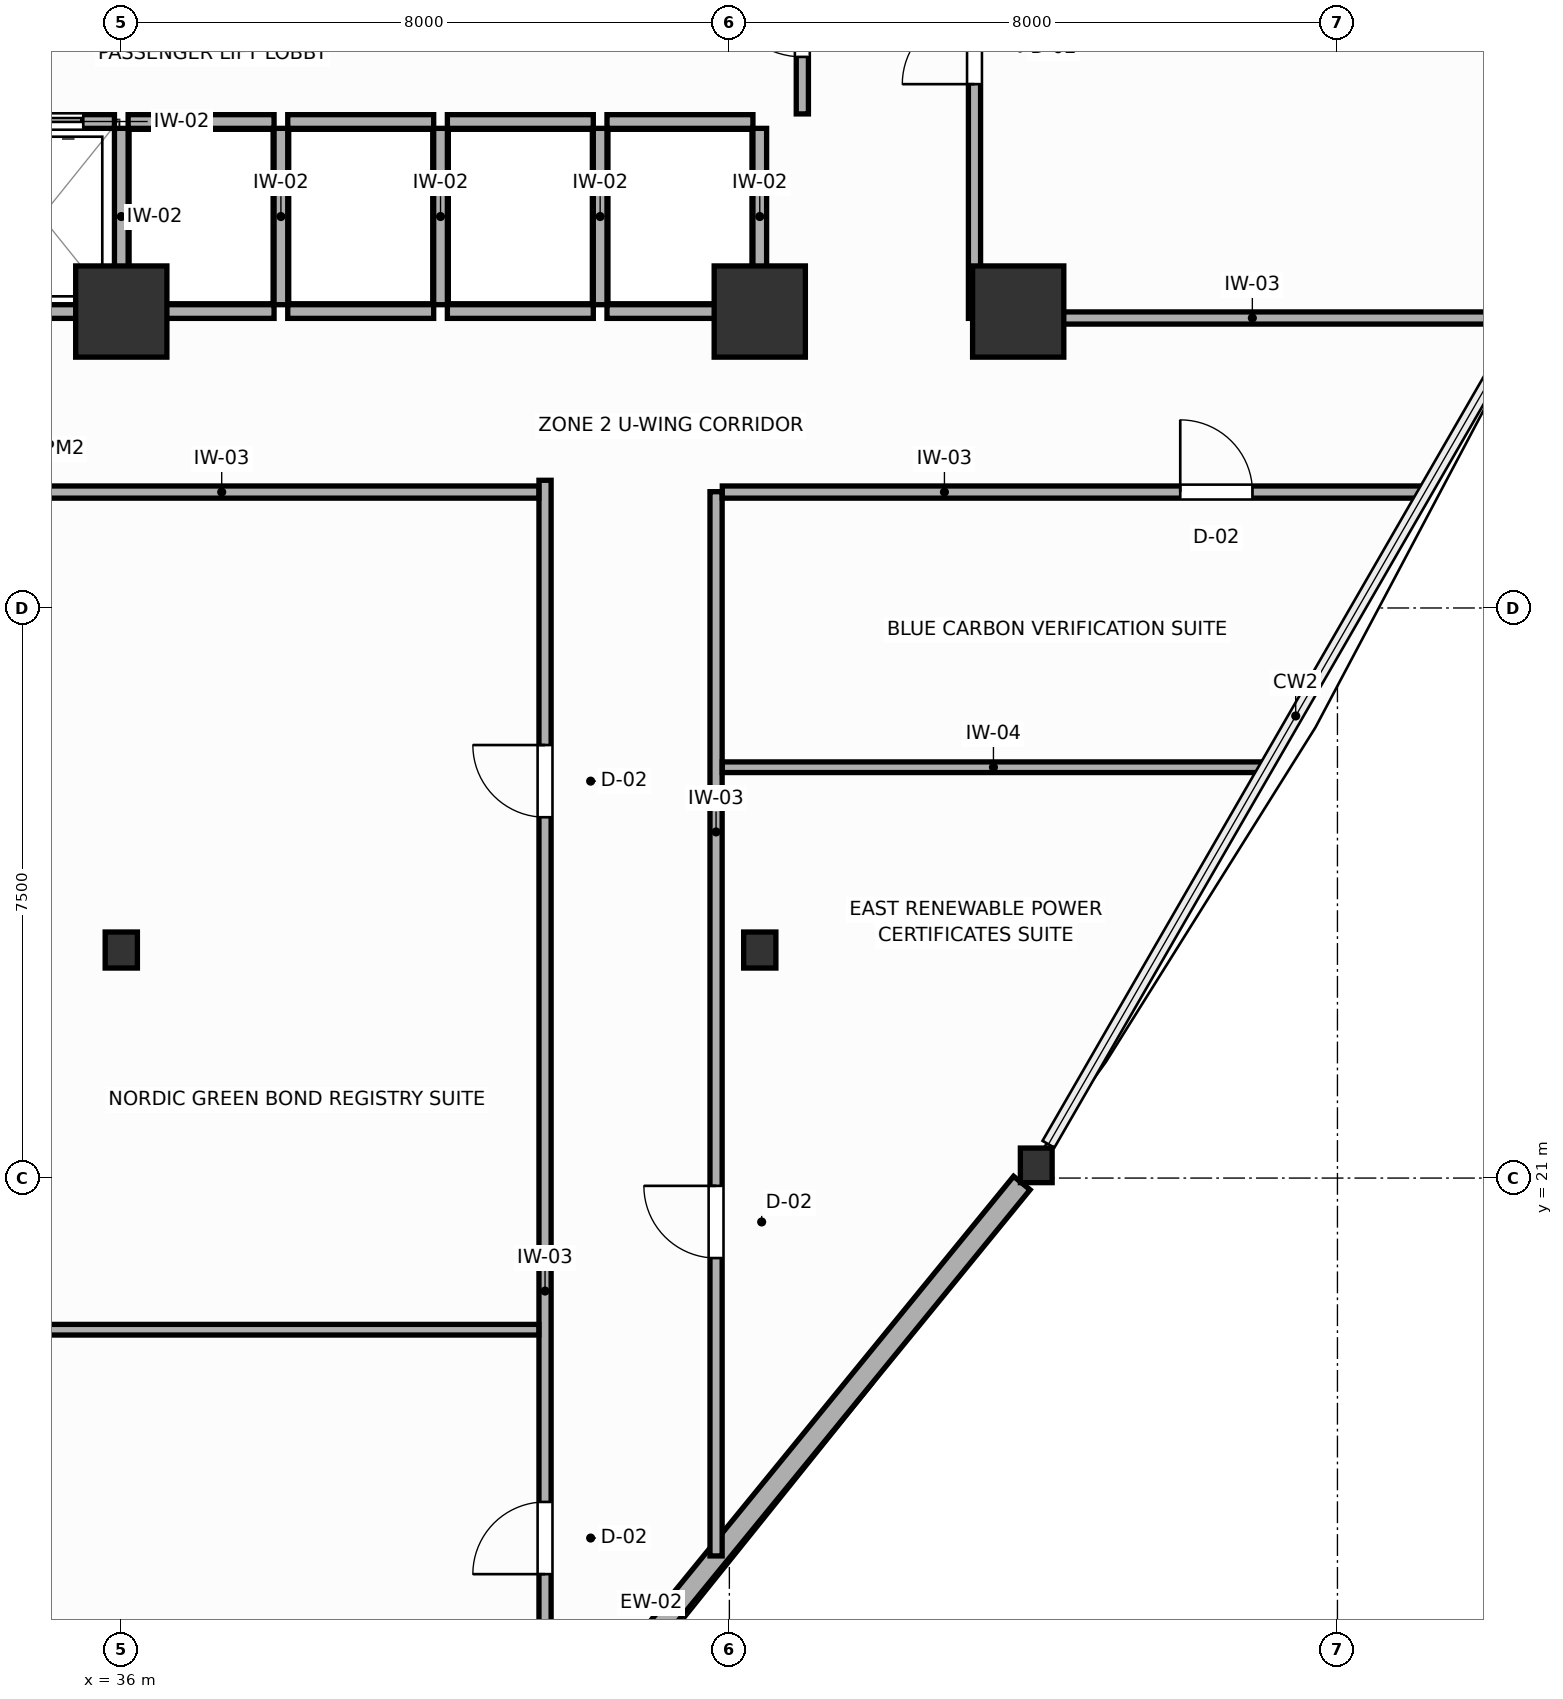
"""IFC4 building model, lengths in metres.
Left out: names, types, materials, properties, quantities, classifications, styles, units other than length and angle.
Written with IfcOpenShell. Run it as: python <this file> out.ifc"""

import sys

from ifc_helpers import new_model, si_unit, direction, frame, frame_2d, origin, origin_2d, place, context, subcontext, project, spatial, rectangle, i_section, extrude, source, transform, mapped, element, fill, save


model = new_model("IFC4")
c1 = context("Model", 3, precision=1e-05, world=origin(), true_north=direction((0.0, 1.0)))
c2 = subcontext(c1, "Body", "Model", "MODEL_VIEW")
j1 = project(units=[si_unit("LENGTHUNIT", "METRE"), si_unit("PLANEANGLEUNIT", "RADIAN")], contexts=[c1])
p1 = place(None, origin())
s1 = spatial("IfcSite", under=j1, at=p1, CompositionType="ELEMENT")
p2 = place(p1, origin())
s2 = spatial("IfcBuilding", under=s1, at=p2, CompositionType="ELEMENT")
p3 = place(p2, frame((0.0, 0.0, 127.8)))
s3 = spatial("IfcBuildingStorey", under=s2, at=p3, CompositionType="ELEMENT", Elevation=127.8)
m1 = source(origin(), c2, "Body", "SweptSolid", [
    extrude(rectangle(XDim=1.2, YDim=1.2, at=origin_2d()), origin(), (0.0, 0.0, 1.0), 3.6),
])
for number, where, z_axis, x_axis in (
    (1, (44.4, 32.4, 0.0), (0.0, 0.0, 1.0), (1.0, 0.0, 0.0)),
    (2, (36.0, 32.4, 0.0), (0.0, 0.0, 1.0), (1.0, 0.0, 0.0)),
    (3, (47.8, 32.4, 0.0), (0.0, 0.0, 1.0), (1.0, 0.0, 0.0)),
):
    element("IfcColumn", number, at=place(p3, frame(where, z_axis=z_axis, x_axis=x_axis)), inside=s3, PredefinedType="COLUMN", context=c2, shape_type="MappedRepresentation", body=[
        mapped(m1, transform((0.0, 0.0, 0.0), scale=1.0)),
    ])
m2 = source(origin(), c2, "Body", "SweptSolid", [
    extrude(i_section(OverallWidth=0.424, OverallDepth=0.474, WebThickness=0.045, FlangeThickness=0.072, FilletRadius=0.015, at=origin_2d()), origin(), (0.0, 0.0, 1.0), 3.6),
])
for number, where, z_axis, x_axis in (
    (4, (44.4, 24.0, 0.0), (0.0, 0.0, 1.0), (1.0, 0.0, 0.0)),
    (5, (36.0, 24.0, 0.0), (0.0, 0.0, 1.0), (1.0, 0.0, 0.0)),
):
    element("IfcColumn", number, at=place(p3, frame(where, z_axis=z_axis, x_axis=x_axis)), inside=s3, PredefinedType="COLUMN", context=c2, shape_type="MappedRepresentation", body=[
        mapped(m2, transform((0.0, 0.0, 0.0), scale=1.0)),
    ])
m3 = source(origin(), c2, "Body", "SweptSolid", [
    extrude(i_section(OverallWidth=0.418, OverallDepth=0.455, WebThickness=0.039, FlangeThickness=0.063, FilletRadius=0.015, at=origin_2d()), origin(), (0.0, 0.0, 1.0), 3.6),
])
p4 = place(p3, frame((48.038, 21.167, 0.0), z_axis=(0.0, 0.0, 1.0), x_axis=(1.0, 0.0, 0.0)))
e6 = element("IfcColumn", 6, at=p4, inside=s3, PredefinedType="COLUMN", context=c2, shape_type="MappedRepresentation", body=[
    mapped(m3, transform((0.0, 0.0, 0.0), scale=1.0)),
])
p5 = place(p3, frame((38.098, 8.996, 0.0), z_axis=(0.0, 0.0, 1.0), x_axis=(0.632511291832, 0.774551138211, 0.0)))
e7 = element("IfcWall", 7, at=p5, inside=s3, PredefinedType="SOLIDWALL", context=c2, shape_type="SweptSolid", body=[
    extrude(rectangle(XDim=15.414, YDim=0.28, at=frame_2d((7.707, 0.0))), origin(), (0.0, 0.0, 1.0), 2.86),
])
p6 = place(p3, frame((33.99, 34.9, 0.0), z_axis=(0.0, 0.0, 1.0), x_axis=(1.0, 0.0, 0.0)))
e8 = element("IfcWall", 8, at=p6, inside=s3, PredefinedType="PARTITIONING", context=c2, shape_type="SweptSolid", body=[
    extrude(rectangle(XDim=1.92, YDim=0.18, at=frame_2d((0.96, 0.0))), origin(), (0.0, 0.0, 1.0), 3.26),
])
p7 = place(p6, frame((0.41, 0.0, 0.0)))
e9 = element("IfcOpeningElement", 9, at=p7, cuts=e8, PredefinedType="OPENING", context=c2, shape_type="SweptSolid", body=[
    extrude(rectangle(XDim=1.1, YDim=2.1, at=frame_2d((0.55, 1.05))), frame((0.0, 0.1, 0.0), z_axis=(0.0, -1.0, 0.0), x_axis=(1.0, 0.0, 0.0)), (0.0, 0.0, 1.0), 0.2),
])
p8 = place(p3, frame((33.99, 32.4, 0.0), z_axis=(0.0, 0.0, 1.0), x_axis=(1.0, 0.0, 0.0)))
e10 = element("IfcWall", 10, at=p8, inside=s3, PredefinedType="PARTITIONING", context=c2, shape_type="SweptSolid", body=[
    extrude(rectangle(XDim=1.92, YDim=0.18, at=frame_2d((0.96, 0.0))), origin(), (0.0, 0.0, 1.0), 2.81),
])
p9 = place(p3, frame((36.09, 34.9, 0.0), z_axis=(0.0, 0.0, 1.0), x_axis=(1.0, 0.0, 0.0)))
e11 = element("IfcWall", 11, at=p9, inside=s3, PredefinedType="PARTITIONING", context=c2, shape_type="SweptSolid", body=[
    extrude(rectangle(XDim=1.92, YDim=0.18, at=frame_2d((0.96, 0.0))), origin(), (0.0, 0.0, 1.0), 3.26),
])
p10 = place(p3, frame((36.09, 32.4, 0.0), z_axis=(0.0, 0.0, 1.0), x_axis=(1.0, 0.0, 0.0)))
e12 = element("IfcWall", 12, at=p10, inside=s3, PredefinedType="PARTITIONING", context=c2, shape_type="SweptSolid", body=[
    extrude(rectangle(XDim=1.92, YDim=0.18, at=frame_2d((0.96, 0.0))), origin(), (0.0, 0.0, 1.0), 2.81),
])
p11 = place(p3, frame((36.0, 32.49, 0.0), z_axis=(0.0, 0.0, 1.0), x_axis=(0.0, 1.0, 0.0)))
e13 = element("IfcWall", 13, at=p11, inside=s3, PredefinedType="PARTITIONING", context=c2, shape_type="SweptSolid", body=[
    extrude(rectangle(XDim=2.32, YDim=0.18, at=frame_2d((1.16, 0.0))), origin(), (0.0, 0.0, 1.0), 3.26),
])
p12 = place(p3, frame((38.19, 34.9, 0.0), z_axis=(0.0, 0.0, 1.0), x_axis=(1.0, 0.0, 0.0)))
e14 = element("IfcWall", 14, at=p12, inside=s3, PredefinedType="PARTITIONING", context=c2, shape_type="SweptSolid", body=[
    extrude(rectangle(XDim=1.92, YDim=0.18, at=frame_2d((0.96, 0.0))), origin(), (0.0, 0.0, 1.0), 3.26),
])
p13 = place(p3, frame((38.19, 32.4, 0.0), z_axis=(0.0, 0.0, 1.0), x_axis=(1.0, 0.0, 0.0)))
e15 = element("IfcWall", 15, at=p13, inside=s3, PredefinedType="PARTITIONING", context=c2, shape_type="SweptSolid", body=[
    extrude(rectangle(XDim=1.92, YDim=0.18, at=frame_2d((0.96, 0.0))), origin(), (0.0, 0.0, 1.0), 2.81),
])
p14 = place(p3, frame((38.1, 32.49, 0.0), z_axis=(0.0, 0.0, 1.0), x_axis=(0.0, 1.0, 0.0)))
e16 = element("IfcWall", 16, at=p14, inside=s3, PredefinedType="PARTITIONING", context=c2, shape_type="SweptSolid", body=[
    extrude(rectangle(XDim=2.32, YDim=0.18, at=frame_2d((1.16, 0.0))), origin(), (0.0, 0.0, 1.0), 3.26),
])
p15 = place(p3, frame((40.29, 34.9, 0.0), z_axis=(0.0, 0.0, 1.0), x_axis=(1.0, 0.0, 0.0)))
e17 = element("IfcWall", 17, at=p15, inside=s3, PredefinedType="PARTITIONING", context=c2, shape_type="SweptSolid", body=[
    extrude(rectangle(XDim=1.92, YDim=0.18, at=frame_2d((0.96, 0.0))), origin(), (0.0, 0.0, 1.0), 3.26),
])
p16 = place(p3, frame((40.29, 32.4, 0.0), z_axis=(0.0, 0.0, 1.0), x_axis=(1.0, 0.0, 0.0)))
e18 = element("IfcWall", 18, at=p16, inside=s3, PredefinedType="PARTITIONING", context=c2, shape_type="SweptSolid", body=[
    extrude(rectangle(XDim=1.92, YDim=0.18, at=frame_2d((0.96, 0.0))), origin(), (0.0, 0.0, 1.0), 2.81),
])
p17 = place(p3, frame((40.2, 32.49, 0.0), z_axis=(0.0, 0.0, 1.0), x_axis=(0.0, 1.0, 0.0)))
e19 = element("IfcWall", 19, at=p17, inside=s3, PredefinedType="PARTITIONING", context=c2, shape_type="SweptSolid", body=[
    extrude(rectangle(XDim=2.32, YDim=0.18, at=frame_2d((1.16, 0.0))), origin(), (0.0, 0.0, 1.0), 3.26),
])
p18 = place(p3, frame((42.39, 34.9, 0.0), z_axis=(0.0, 0.0, 1.0), x_axis=(1.0, 0.0, 0.0)))
e20 = element("IfcWall", 20, at=p18, inside=s3, PredefinedType="PARTITIONING", context=c2, shape_type="SweptSolid", body=[
    extrude(rectangle(XDim=1.92, YDim=0.18, at=frame_2d((0.96, 0.0))), origin(), (0.0, 0.0, 1.0), 3.26),
])
p19 = place(p3, frame((42.39, 32.4, 0.0), z_axis=(0.0, 0.0, 1.0), x_axis=(1.0, 0.0, 0.0)))
e21 = element("IfcWall", 21, at=p19, inside=s3, PredefinedType="PARTITIONING", context=c2, shape_type="SweptSolid", body=[
    extrude(rectangle(XDim=1.92, YDim=0.18, at=frame_2d((0.96, 0.0))), origin(), (0.0, 0.0, 1.0), 2.81),
])
for number, where, z_axis, x_axis in (
    (22, (42.3, 32.49, 0.0), (0.0, 0.0, 1.0), (0.0, 1.0, 0.0)),
    (23, (44.4, 32.49, 0.0), (0.0, 0.0, 1.0), (0.0, 1.0, 0.0)),
):
    element("IfcWall", number, at=place(p3, frame(where, z_axis=z_axis, x_axis=x_axis)), inside=s3, PredefinedType="PARTITIONING", context=c2, shape_type="SweptSolid", body=[
        extrude(rectangle(XDim=2.32, YDim=0.18, at=frame_2d((1.16, 0.0))), origin(), (0.0, 0.0, 1.0), 3.26),
    ])
p20 = place(p3, frame((44.96, 35.0, 0.0), z_axis=(0.0, 0.0, 1.0), x_axis=(0.0, 1.0, 0.0)))
e24 = element("IfcWall", 24, at=p20, inside=s3, PredefinedType="PARTITIONING", context=c2, shape_type="SweptSolid", body=[
    extrude(rectangle(XDim=2.65, YDim=0.16, at=frame_2d((1.325, 0.0))), origin(), (0.0, 0.0, 1.0), 3.26),
])
p21 = place(p20, frame((0.75, 0.0, 0.0)))
e25 = element("IfcOpeningElement", 25, at=p21, cuts=e24, PredefinedType="OPENING", context=c2, shape_type="SweptSolid", body=[
    extrude(rectangle(XDim=1.05, YDim=2.1, at=frame_2d((0.525, 1.05))), frame((0.0, 0.09, 0.0), z_axis=(0.0, -1.0, 0.0), x_axis=(1.0, 0.0, 0.0)), (0.0, 0.0, 1.0), 0.18),
])
p22 = place(p3, frame((47.225, 32.31, 0.0), z_axis=(0.0, 0.0, 1.0), x_axis=(0.0, 1.0, 0.0)))
e26 = element("IfcWall", 26, at=p22, inside=s3, PredefinedType="PARTITIONING", context=c2, shape_type="SweptSolid", body=[
    extrude(rectangle(XDim=20.796, YDim=0.16, at=frame_2d((10.398, 0.0))), origin(), (0.0, 0.0, 1.0), 3.26),
])
p23 = place(p22, frame((3.082, 0.0, 0.0)))
e27 = element("IfcOpeningElement", 27, at=p23, cuts=e26, PredefinedType="OPENING", context=c2, shape_type="SweptSolid", body=[
    extrude(rectangle(XDim=0.95, YDim=2.05, at=frame_2d((0.475, 1.025))), frame((0.0, 0.09, 0.0), z_axis=(0.0, -1.0, 0.0), x_axis=(1.0, 0.0, 0.0)), (0.0, 0.0, 1.0), 0.18),
])
p24 = place(p22, frame((11.46, 0.0, 0.0)))
e28 = element("IfcOpeningElement", 28, at=p24, cuts=e26, PredefinedType="OPENING", context=c2, shape_type="SweptSolid", body=[
    extrude(rectangle(XDim=0.95, YDim=2.05, at=frame_2d((0.475, 1.025))), frame((0.0, 0.09, 0.0), z_axis=(0.0, -1.0, 0.0), x_axis=(1.0, 0.0, 0.0)), (0.0, 0.0, 1.0), 0.18),
])
p25 = place(p3, frame((41.575, 13.274, 0.0), z_axis=(0.0, 0.0, 1.0), x_axis=(0.0, 1.0, 0.0)))
e29 = element("IfcWall", 29, at=p25, inside=s3, PredefinedType="PARTITIONING", context=c2, shape_type="SweptSolid", body=[
    extrude(rectangle(XDim=16.906, YDim=0.16, at=frame_2d((8.453, 0.0))), origin(), (0.0, 0.0, 1.0), 3.26),
])
p26 = place(p25, frame((2.516, 0.0, 0.0)))
e30 = element("IfcOpeningElement", 30, at=p26, cuts=e29, PredefinedType="OPENING", context=c2, shape_type="SweptSolid", body=[
    extrude(rectangle(XDim=0.95, YDim=2.05, at=frame_2d((0.475, 1.025))), frame((0.0, 0.09, 0.0), z_axis=(0.0, -1.0, 0.0), x_axis=(1.0, 0.0, 0.0)), (0.0, 0.0, 1.0), 0.18),
])
p27 = place(p25, frame((12.473, 0.0, 0.0)))
e31 = element("IfcOpeningElement", 31, at=p27, cuts=e29, PredefinedType="OPENING", context=c2, shape_type="SweptSolid", body=[
    extrude(rectangle(XDim=0.95, YDim=2.05, at=frame_2d((0.475, 1.025))), frame((0.0, 0.09, 0.0), z_axis=(0.0, -1.0, 0.0), x_axis=(1.0, 0.0, 0.0)), (0.0, 0.0, 1.0), 0.18),
])
p28 = place(p3, frame((43.825, 16.029, 0.0), z_axis=(0.0, 0.0, 1.0), x_axis=(0.0, 1.0, 0.0)))
e32 = element("IfcWall", 32, at=p28, inside=s3, PredefinedType="PARTITIONING", context=c2, shape_type="SweptSolid", body=[
    extrude(rectangle(XDim=14.001, YDim=0.16, at=frame_2d((7.0, 0.0))), origin(), (0.0, 0.0, 1.0), 2.86),
])
p29 = place(p28, frame((3.919, 0.0, 0.0)))
e33 = element("IfcOpeningElement", 33, at=p29, cuts=e32, PredefinedType="OPENING", context=c2, shape_type="SweptSolid", body=[
    extrude(rectangle(XDim=0.95, YDim=2.05, at=frame_2d((0.475, 1.025))), frame((0.0, 0.09, 0.0), z_axis=(0.0, -1.0, 0.0), x_axis=(1.0, 0.0, 0.0)), (0.0, 0.0, 1.0), 0.18),
])
p30 = place(p3, frame((30.507, 30.025, 0.0), z_axis=(0.0, 0.0, 1.0), x_axis=(1.0, 0.0, 0.0)))
e34 = element("IfcWall", 34, at=p30, inside=s3, PredefinedType="PARTITIONING", context=c2, shape_type="SweptSolid", body=[
    extrude(rectangle(XDim=10.986, YDim=0.16, at=frame_2d((5.493, 0.0))), origin(), (0.0, 0.0, 1.0), 3.26),
])
p31 = place(p30, frame((1.512, 0.0, 0.0)))
e35 = element("IfcOpeningElement", 35, at=p31, cuts=e34, PredefinedType="OPENING", context=c2, shape_type="SweptSolid", body=[
    extrude(rectangle(XDim=0.95, YDim=2.05, at=frame_2d((0.475, 1.025))), frame((0.0, 0.09, 0.0), z_axis=(0.0, -1.0, 0.0), x_axis=(1.0, 0.0, 0.0)), (0.0, 0.0, 1.0), 0.18),
])
p32 = place(p3, frame((43.907, 30.025, 0.0), z_axis=(0.0, 0.0, 1.0), x_axis=(1.0, 0.0, 0.0)))
e36 = element("IfcWall", 36, at=p32, inside=s3, PredefinedType="PARTITIONING", context=c2, shape_type="SweptSolid", body=[
    extrude(rectangle(XDim=9.225, YDim=0.16, at=frame_2d((4.612, 0.0))), origin(), (0.0, 0.0, 1.0), 3.26),
])
p33 = place(p32, frame((6.025, 0.0, 0.0)))
e37 = element("IfcOpeningElement", 37, at=p33, cuts=e36, PredefinedType="OPENING", context=c2, shape_type="SweptSolid", body=[
    extrude(rectangle(XDim=0.95, YDim=2.05, at=frame_2d((0.475, 1.025))), frame((0.0, 0.09, 0.0), z_axis=(0.0, -1.0, 0.0), x_axis=(1.0, 0.0, 0.0)), (0.0, 0.0, 1.0), 0.18),
])
p34 = place(p3, frame((47.307, 32.315, 0.0), z_axis=(0.0, 0.0, 1.0), x_axis=(1.0, 0.0, 0.0)))
e38 = element("IfcWall", 38, at=p34, inside=s3, PredefinedType="PARTITIONING", context=c2, shape_type="SweptSolid", body=[
    extrude(rectangle(XDim=7.147, YDim=0.16, at=frame_2d((3.573, 0.0))), origin(), (0.0, 0.0, 1.0), 2.81),
])
p35 = place(p3, frame((30.507, 19.005, 0.0), z_axis=(0.0, 0.0, 1.0), x_axis=(1.0, 0.0, 0.0)))
e39 = element("IfcWall", 39, at=p35, inside=s3, PredefinedType="PARTITIONING", context=c2, shape_type="SweptSolid", body=[
    extrude(rectangle(XDim=10.986, YDim=0.14, at=frame_2d((5.493, 0.0))), origin(), (0.0, 0.0, 1.0), 3.26),
])
p36 = place(p3, frame((43.907, 26.405, 0.0), z_axis=(0.0, 0.0, 1.0), x_axis=(1.0, 0.0, 0.0)))
e40 = element("IfcWall", 40, at=p36, inside=s3, PredefinedType="PARTITIONING", context=c2, shape_type="SweptSolid", body=[
    extrude(rectangle(XDim=7.135, YDim=0.14, at=frame_2d((3.567, 0.0))), origin(), (0.0, 0.0, 1.0), 3.26),
])
p37 = place(p7, origin())
e41 = element("IfcDoor", 41, at=p37, inside=s3, OperationType="DOUBLE_DOOR_SLIDING", PredefinedType="DOOR", context=c2, shape_type="SweptSolid", body=[
    extrude(rectangle(XDim=1.1, YDim=2.1, at=frame_2d((0.55, 1.05))), frame((0.0, 0.025, 0.0), z_axis=(0.0, -1.0, 0.0), x_axis=(1.0, 0.0, 0.0)), (0.0, 0.0, 1.0), 0.05),
])
fill(e9, e41)
p38 = place(p21, origin())
e42 = element("IfcDoor", 42, at=p38, inside=s3, OperationType="SINGLE_SWING_RIGHT", PredefinedType="DOOR", context=c2, shape_type="SweptSolid", body=[
    extrude(rectangle(XDim=1.05, YDim=2.1, at=frame_2d((0.525, 1.05))), frame((0.0, 0.025, 0.0), z_axis=(0.0, -1.0, 0.0), x_axis=(1.0, 0.0, 0.0)), (0.0, 0.0, 1.0), 0.05),
])
fill(e25, e42)
p39 = place(p23, origin())
e43 = element("IfcDoor", 43, at=p39, inside=s3, OperationType="SINGLE_SWING_LEFT", PredefinedType="DOOR", context=c2, shape_type="SweptSolid", body=[
    extrude(rectangle(XDim=0.95, YDim=2.05, at=frame_2d((0.475, 1.025))), frame((0.0, 0.025, 0.0), z_axis=(0.0, -1.0, 0.0), x_axis=(1.0, 0.0, 0.0)), (0.0, 0.0, 1.0), 0.05),
])
fill(e27, e43)
p40 = place(p26, origin())
e44 = element("IfcDoor", 44, at=p40, inside=s3, OperationType="SINGLE_SWING_LEFT", PredefinedType="DOOR", context=c2, shape_type="SweptSolid", body=[
    extrude(rectangle(XDim=0.95, YDim=2.05, at=frame_2d((0.475, 1.025))), frame((0.0, 0.025, 0.0), z_axis=(0.0, -1.0, 0.0), x_axis=(1.0, 0.0, 0.0)), (0.0, 0.0, 1.0), 0.05),
])
fill(e30, e44)
p41 = place(p27, origin())
e45 = element("IfcDoor", 45, at=p41, inside=s3, OperationType="SINGLE_SWING_RIGHT", PredefinedType="DOOR", context=c2, shape_type="SweptSolid", body=[
    extrude(rectangle(XDim=0.95, YDim=2.05, at=frame_2d((0.475, 1.025))), frame((0.0, 0.025, 0.0), z_axis=(0.0, -1.0, 0.0), x_axis=(1.0, 0.0, 0.0)), (0.0, 0.0, 1.0), 0.05),
])
fill(e31, e45)
p42 = place(p29, origin())
e46 = element("IfcDoor", 46, at=p42, inside=s3, OperationType="SINGLE_SWING_RIGHT", PredefinedType="DOOR", context=c2, shape_type="SweptSolid", body=[
    extrude(rectangle(XDim=0.95, YDim=2.05, at=frame_2d((0.475, 1.025))), frame((0.0, 0.025, 0.0), z_axis=(0.0, -1.0, 0.0), x_axis=(1.0, 0.0, 0.0)), (0.0, 0.0, 1.0), 0.05),
])
fill(e33, e46)
p43 = place(p33, origin())
e47 = element("IfcDoor", 47, at=p43, inside=s3, OperationType="SINGLE_SWING_LEFT", PredefinedType="DOOR", context=c2, shape_type="SweptSolid", body=[
    extrude(rectangle(XDim=0.95, YDim=2.05, at=frame_2d((0.475, 1.025))), frame((0.0, 0.025, 0.0), z_axis=(0.0, -1.0, 0.0), x_axis=(1.0, 0.0, 0.0)), (0.0, 0.0, 1.0), 0.05),
])
fill(e37, e47)
save(model, sys.argv[1])
